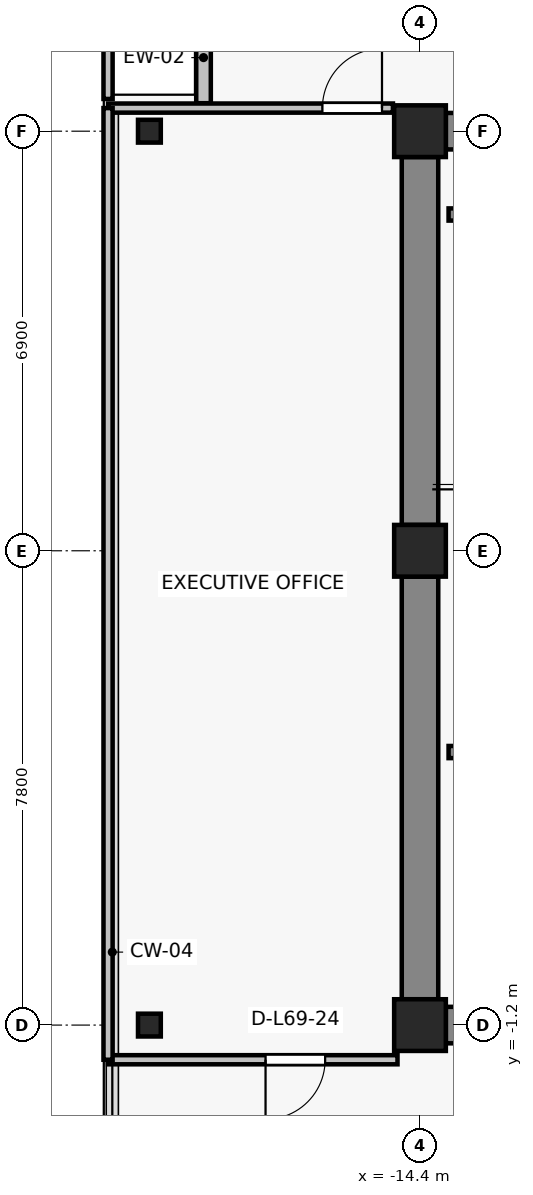
"""IFC4 building model, lengths in metres.
Left out: names, types, materials, properties, quantities, classifications, styles, units other than length and angle.
Written with IfcOpenShell. Run it as: python <this file> out.ifc"""

import sys

from ifc_helpers import new_model, si_unit, direction, frame, frame_2d, origin, origin_2d, place, context, subcontext, project, spatial, rectangle, i_section, extrude, source, transform, mapped, element, fill, save


model = new_model("IFC4")
c1 = context("Model", 3, precision=1e-05, world=origin(), true_north=direction((0.0, 1.0)))
c2 = subcontext(c1, "Body", "Model", "MODEL_VIEW")
j1 = project(units=[si_unit("LENGTHUNIT", "METRE"), si_unit("PLANEANGLEUNIT", "RADIAN")], contexts=[c1])
p1 = place(None, origin())
s1 = spatial("IfcSite", under=j1, at=p1, CompositionType="ELEMENT")
p2 = place(p1, origin())
s2 = spatial("IfcBuilding", under=s1, at=p2, CompositionType="ELEMENT")
p3 = place(p2, frame((0.0, 0.0, 245.2)))
s3 = spatial("IfcBuildingStorey", under=s2, at=p3, CompositionType="ELEMENT", Elevation=245.2)
for number, where, z_axis, x_axis in (
    (1, (-14.4, -1.2, 0.0), (0.0, 0.0, 1.0), (1.0, 0.0, 0.0)),
    (2, (-14.4, 6.6, 0.0), (0.0, 0.0, 1.0), (1.0, 0.0, 0.0)),
    (3, (-14.4, 13.5, 0.0), (0.0, 0.0, 1.0), (1.0, 0.0, 0.0)),
):
    element("IfcColumn", number, at=place(p3, frame(where, z_axis=z_axis, x_axis=x_axis)), inside=s3, PredefinedType="COLUMN", context=c2, shape_type="SweptSolid", body=[
        extrude(rectangle(XDim=0.85, YDim=0.85, at=origin_2d()), origin(), (0.0, 0.0, 1.0), 3.3),
    ])
for number, where, z_axis, x_axis in (
    (4, (-18.85, -1.2, 0.0), (0.0, 0.0, 1.0), (1.0, 0.0, 0.0)),
    (5, (-18.85, 13.5, 0.0), (0.0, 0.0, 1.0), (1.0, 0.0, 0.0)),
):
    element("IfcColumn", number, at=place(p3, frame(where, z_axis=z_axis, x_axis=x_axis)), inside=s3, PredefinedType="COLUMN", context=c2, shape_type="SweptSolid", body=[
        extrude(i_section(OverallWidth=0.375, OverallDepth=0.375, WebThickness=0.017, FlangeThickness=0.027, FilletRadius=0.015, at=origin_2d()), origin(), (0.0, 0.0, 1.0), 3.3),
    ])
p4 = place(p3, frame((-13.975, 13.5, 0.0), z_axis=(0.0, 0.0, 1.0), x_axis=(1.0, 0.0, 0.0)))
e6 = element("IfcWall", 6, at=p4, inside=s3, PredefinedType="SHEAR", context=c2, shape_type="SweptSolid", body=[
    extrude(rectangle(XDim=6.35, YDim=0.6, at=frame_2d((3.175, 0.0))), origin(), (0.0, 0.0, 1.0), 3.075),
])
p5 = place(p3, frame((-14.4, -0.775, 0.0), z_axis=(0.0, 0.0, 1.0), x_axis=(0.0, 1.0, 0.0)))
e7 = element("IfcWall", 7, at=p5, inside=s3, PredefinedType="SHEAR", context=c2, shape_type="SweptSolid", body=[
    extrude(rectangle(XDim=6.95, YDim=0.6, at=frame_2d((3.475, 0.0))), origin(), (0.0, 0.0, 1.0), 3.075),
])
p6 = place(p3, frame((-14.4, 7.025, 0.0), z_axis=(0.0, 0.0, 1.0), x_axis=(0.0, 1.0, 0.0)))
e8 = element("IfcWall", 8, at=p6, inside=s3, PredefinedType="SHEAR", context=c2, shape_type="SweptSolid", body=[
    extrude(rectangle(XDim=6.05, YDim=0.6, at=frame_2d((3.025, 0.0))), origin(), (0.0, 0.0, 1.0), 3.075),
])
p7 = place(p3, frame((-7.625, -1.2, 0.0), z_axis=(0.0, 0.0, 1.0), x_axis=(-1.0, 0.0, 0.0)))
e9 = element("IfcWall", 9, at=p7, inside=s3, PredefinedType="SHEAR", context=c2, shape_type="SweptSolid", body=[
    extrude(rectangle(XDim=6.35, YDim=0.6, at=frame_2d((3.175, 0.0))), origin(), (0.0, 0.0, 1.0), 3.075),
])
p8 = place(p7, frame((2.7, 0.0, 0.0)))
e10 = element("IfcOpeningElement", 10, at=p8, cuts=e9, PredefinedType="OPENING", context=c2, shape_type="SweptSolid", body=[
    extrude(rectangle(XDim=1.15, YDim=2.15, at=frame_2d((0.575, 1.075))), frame((0.0, 0.31, 0.0), z_axis=(0.0, -1.0, 0.0), x_axis=(1.0, 0.0, 0.0)), (0.0, 0.0, 1.0), 0.62),
])
p9 = place(p3, frame((-17.96, 15.46, 0.0), z_axis=(0.0, 0.0, 1.0), x_axis=(0.0, -1.0, 0.0)))
e11 = element("IfcWall", 11, at=p9, inside=s3, PredefinedType="SOLIDWALL", context=c2, shape_type="SweptSolid", body=[
    extrude(rectangle(XDim=1.5, YDim=0.24, at=frame_2d((0.75, 0.0))), origin(), (0.0, 0.0, 1.0), 3.075),
])
p10 = place(p3, frame((-10.41, 3.29, 0.0), z_axis=(0.0, 0.0, 1.0), x_axis=(-1.0, 0.0, 0.0)))
e12 = element("IfcWall", 12, at=p10, inside=s3, PredefinedType="SOLIDWALL", context=c2, shape_type="SweptSolid", body=[
    extrude(rectangle(XDim=3.52, YDim=0.2, at=frame_2d((1.76, 0.0))), origin(), (0.0, 0.0, 1.0), 3.075),
])
p11 = place(p10, frame((1.165, 0.0, 0.0)))
e13 = element("IfcOpeningElement", 13, at=p11, cuts=e12, PredefinedType="OPENING", context=c2, shape_type="SweptSolid", body=[
    extrude(rectangle(XDim=1.15, YDim=2.15, at=frame_2d((0.575, 1.075))), frame((0.0, 0.11, 0.0), z_axis=(0.0, -1.0, 0.0), x_axis=(1.0, 0.0, 0.0)), (0.0, 0.0, 1.0), 0.22),
])
p12 = place(p3, frame((-13.93, 12.13, 0.0), z_axis=(0.0, 0.0, 1.0), x_axis=(1.0, 0.0, 0.0)))
e14 = element("IfcWall", 14, at=p12, inside=s3, PredefinedType="SOLIDWALL", context=c2, shape_type="SweptSolid", body=[
    extrude(rectangle(XDim=3.52, YDim=0.2, at=frame_2d((1.76, 0.0))), origin(), (0.0, 0.0, 1.0), 3.075),
])
p13 = place(p3, frame((-14.77, -1.77, 0.0), z_axis=(0.0, 0.0, 1.0), x_axis=(-1.0, 0.0, 0.0)))
e15 = element("IfcWall", 15, at=p13, inside=s3, PredefinedType="PARTITIONING", context=c2, shape_type="SweptSolid", body=[
    extrude(rectangle(XDim=4.76, YDim=0.15, at=frame_2d((2.38, 0.0))), origin(), (0.0, 0.0, 1.0), 2.765),
])
p14 = place(p13, frame((1.19, 0.0, 0.0)))
e16 = element("IfcOpeningElement", 16, at=p14, cuts=e15, PredefinedType="OPENING", context=c2, shape_type="SweptSolid", body=[
    extrude(rectangle(XDim=0.98, YDim=2.15, at=frame_2d((0.49, 1.075))), frame((0.0, 0.085, 0.0), z_axis=(0.0, -1.0, 0.0), x_axis=(1.0, 0.0, 0.0)), (0.0, 0.0, 1.0), 0.17),
])
p15 = place(p3, frame((-19.53, 13.88, 0.0), z_axis=(0.0, 0.0, 1.0), x_axis=(1.0, 0.0, 0.0)))
e17 = element("IfcWall", 17, at=p15, inside=s3, PredefinedType="PARTITIONING", context=c2, shape_type="SweptSolid", body=[
    extrude(rectangle(XDim=4.685, YDim=0.15, at=frame_2d((2.343, 0.0))), origin(), (0.0, 0.0, 1.0), 3.075),
])
p16 = place(p15, frame((3.525, 0.0, 0.0)))
e18 = element("IfcOpeningElement", 18, at=p16, cuts=e17, PredefinedType="OPENING", context=c2, shape_type="SweptSolid", body=[
    extrude(rectangle(XDim=0.98, YDim=2.15, at=frame_2d((0.49, 1.075))), frame((0.0, 0.085, 0.0), z_axis=(0.0, -1.0, 0.0), x_axis=(1.0, 0.0, 0.0)), (0.0, 0.0, 1.0), 0.17),
])
p17 = place(p3, frame((-19.53, -1.77, 0.0), z_axis=(0.0, 0.0, 1.0), x_axis=(0.0, 1.0, 0.0)))
e19 = element("IfcWall", 19, at=p17, inside=s3, PredefinedType="PARTITIONING", context=c2, shape_type="SweptSolid", body=[
    extrude(rectangle(XDim=15.65, YDim=0.15, at=frame_2d((7.825, 0.0))), origin(), (0.0, 0.0, 1.0), 3.075),
])
p18 = place(p3, frame((-19.53, 14.03, 0.0), z_axis=(0.0, 0.0, 1.0), x_axis=(0.0, 1.0, 0.0)))
e20 = element("IfcWall", 20, at=p18, inside=s3, PredefinedType="PARTITIONING", context=c2, shape_type="SweptSolid", body=[
    extrude(rectangle(XDim=3.0, YDim=0.15, at=frame_2d((1.5, 0.0))), origin(), (0.0, 0.0, 1.0), 3.075),
])
m1 = source(origin(), c2, "Body", "SweptSolid", [
    extrude(rectangle(XDim=0.98, YDim=2.15, at=frame_2d((0.49, 1.075))), frame((0.0, 0.025, 0.0), z_axis=(0.0, -1.0, 0.0), x_axis=(1.0, 0.0, 0.0)), (0.0, 0.0, 1.0), 0.05),
])
p19 = place(p14, origin())
e21 = element("IfcDoor", 21, at=p19, inside=s3, OperationType="SINGLE_SWING_RIGHT", PredefinedType="DOOR", context=c2, shape_type="MappedRepresentation", body=[
    mapped(m1, transform((0.0, 0.0, 0.0), x_axis=(1.0, 0.0, 0.0), y_axis=(0.0, 1.0, 0.0), z_axis=(0.0, 0.0, 1.0), scale=1.0)),
])
fill(e16, e21)
p20 = place(p16, origin())
e22 = element("IfcDoor", 22, at=p20, inside=s3, OperationType="SINGLE_SWING_RIGHT", PredefinedType="DOOR", context=c2, shape_type="MappedRepresentation", body=[
    mapped(m1, transform((0.0, 0.0, 0.0), x_axis=(1.0, 0.0, 0.0), y_axis=(0.0, 1.0, 0.0), z_axis=(0.0, 0.0, 1.0), scale=1.0)),
])
fill(e18, e22)
save(model, sys.argv[1])
